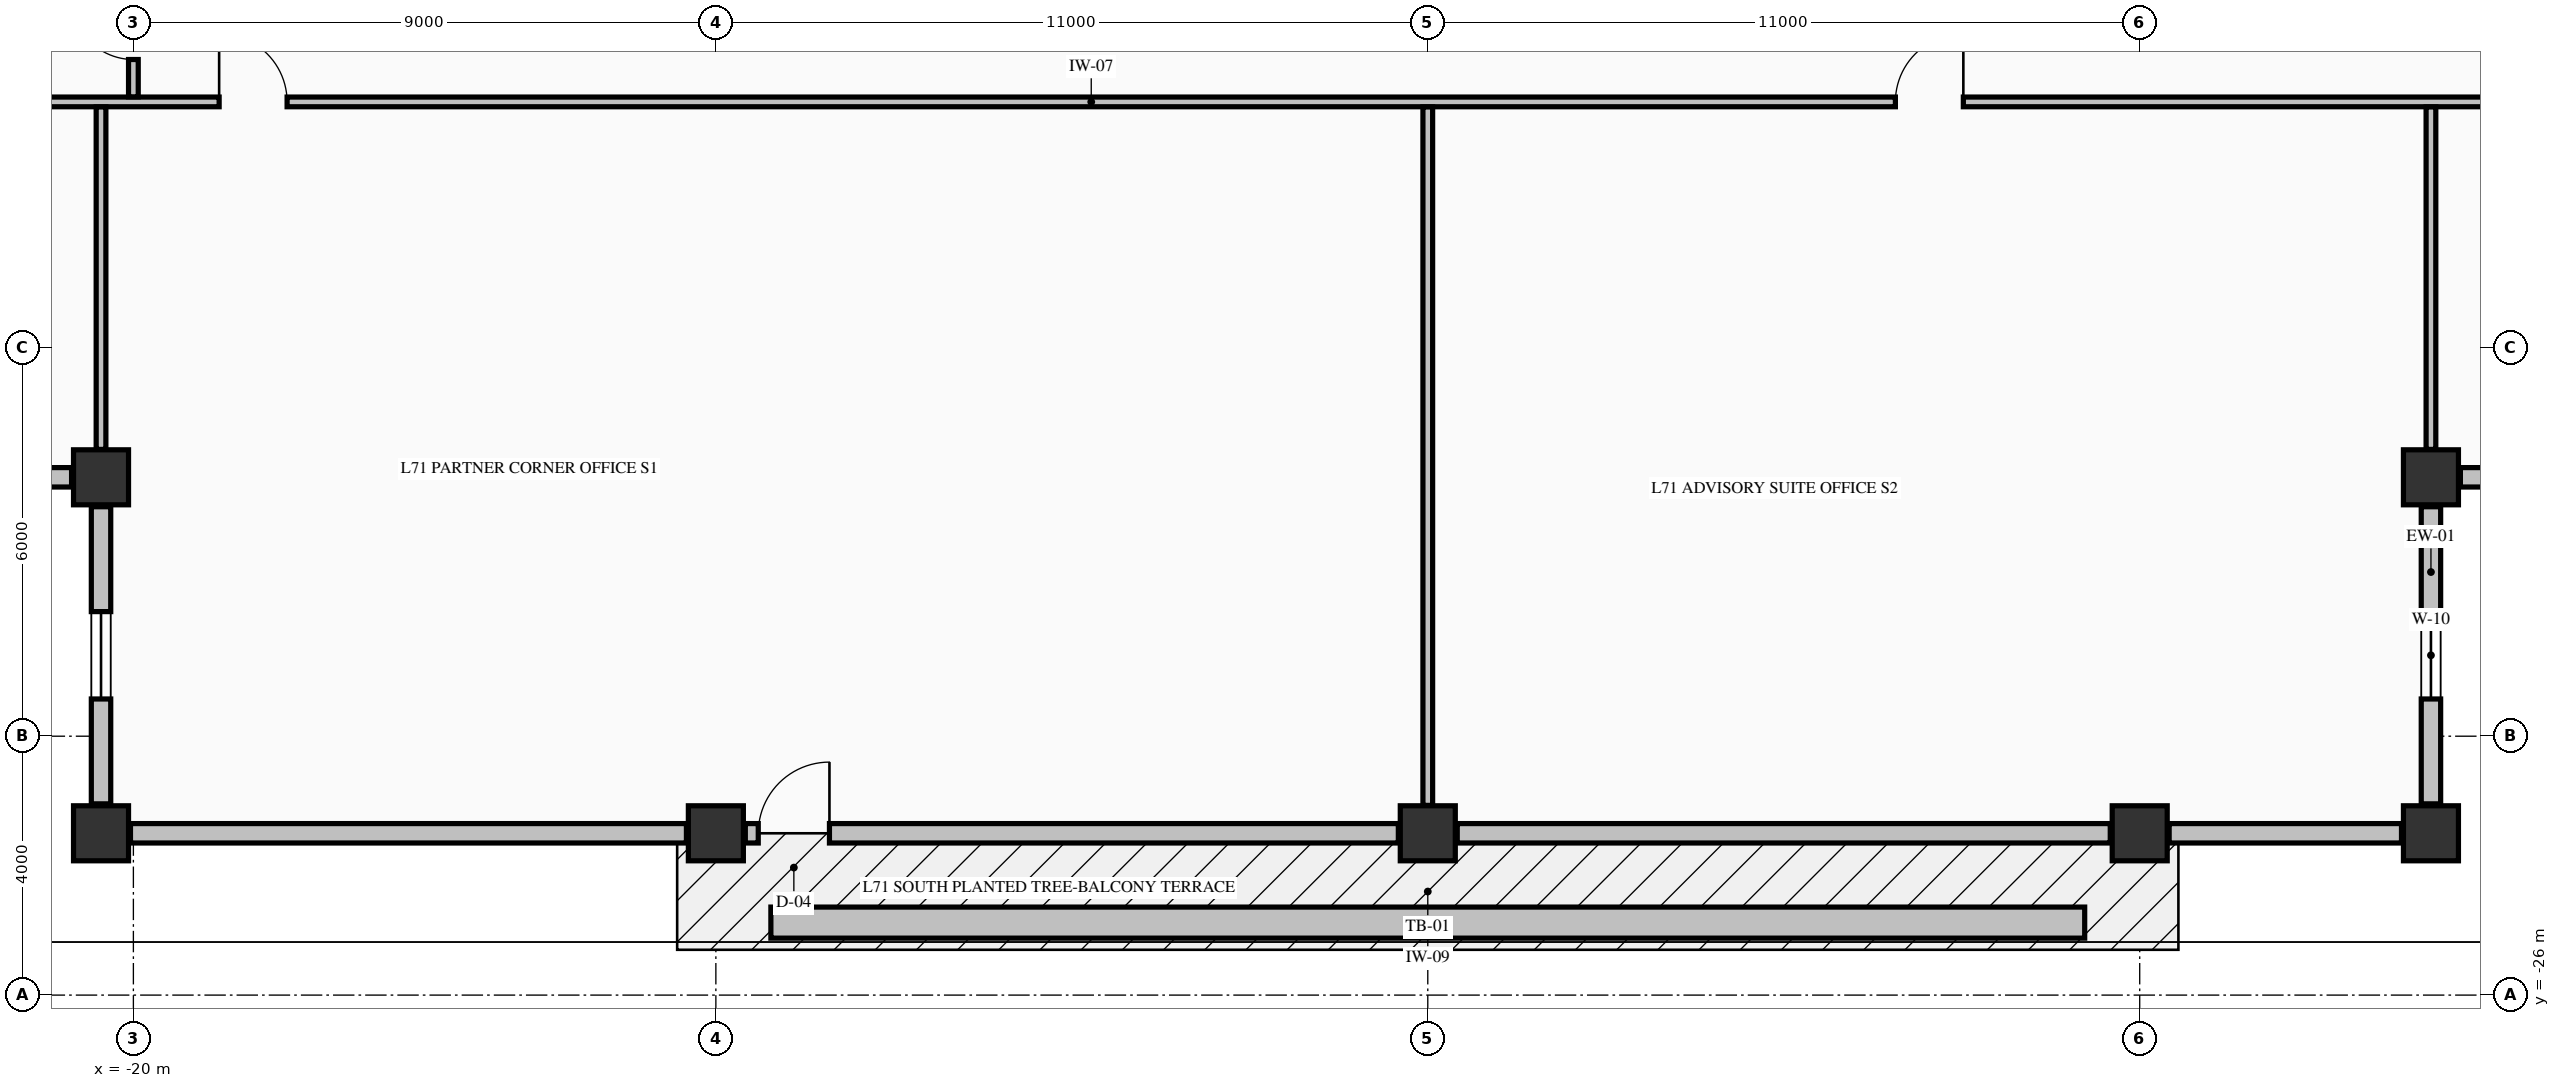
"""IFC4 building model, lengths in metres.
Left out: names, types, materials, properties, quantities, classifications, styles, units other than length and angle.
Written with IfcOpenShell. Run it as: python <this file> out.ifc"""

import sys

from ifc_helpers import new_model, si_unit, direction, frame, frame_2d, origin, origin_2d, place, context, subcontext, project, spatial, rectangle, extrude, element, fill, save


model = new_model("IFC4")
c1 = context("Model", 3, precision=1e-05, world=origin(), true_north=direction((0.0, 1.0)))
c2 = subcontext(c1, "Body", "Model", "MODEL_VIEW")
j1 = project(units=[si_unit("LENGTHUNIT", "METRE"), si_unit("PLANEANGLEUNIT", "RADIAN")], contexts=[c1])
p1 = place(None, origin())
s1 = spatial("IfcSite", under=j1, at=p1, CompositionType="ELEMENT")
p2 = place(p1, origin())
s2 = spatial("IfcBuilding", under=s1, at=p2, CompositionType="ELEMENT")
p3 = place(p2, frame((0.0, 0.0, 267.35)))
s3 = spatial("IfcBuildingStorey", under=s2, at=p3, CompositionType="ELEMENT", Elevation=267.35)
for number, where, z_axis, x_axis in (
    (1, (-20.5, -23.5, -0.25), (0.0, 0.0, 1.0), (1.0, 0.0, 0.0)),
    (2, (-11.0, -23.5, -0.25), (0.0, 0.0, 1.0), (1.0, 0.0, 0.0)),
    (3, (0.0, -23.5, -0.25), (0.0, 0.0, 1.0), (1.0, 0.0, 0.0)),
    (4, (11.0, -23.5, -0.25), (0.0, 0.0, 1.0), (1.0, 0.0, 0.0)),
    (5, (15.5, -23.5, -0.25), (0.0, 0.0, 1.0), (1.0, 0.0, 0.0)),
    (6, (-20.5, -18.0, -0.25), (0.0, 0.0, 1.0), (1.0, 0.0, 0.0)),
    (7, (15.5, -18.0, -0.25), (0.0, 0.0, 1.0), (1.0, 0.0, 0.0)),
):
    element("IfcColumn", number, at=place(p3, frame(where, z_axis=z_axis, x_axis=x_axis)), inside=s3, PredefinedType="COLUMN", context=c2, shape_type="SweptSolid", body=[
        extrude(rectangle(XDim=0.85, YDim=0.85, at=origin_2d()), origin(), (0.0, 0.0, 1.0), 3.155),
    ])
p4 = place(p3, frame((15.5, -23.045, 0.0), z_axis=(0.0, 0.0, 1.0), x_axis=(0.0, 1.0, 0.0)))
e8 = element("IfcWall", 8, at=p4, inside=s3, PredefinedType="STANDARD", context=c2, shape_type="SweptSolid", body=[
    extrude(rectangle(XDim=4.59, YDim=0.3, at=frame_2d((2.295, 0.0))), origin(), (0.0, 0.0, 1.0), 2.297),
])
p5 = place(p4, frame((1.62, 0.0, 0.68)))
e9 = element("IfcOpeningElement", 9, at=p5, cuts=e8, PredefinedType="OPENING", context=c2, shape_type="SweptSolid", body=[
    extrude(rectangle(XDim=1.35, YDim=1.42, at=frame_2d((0.675, 0.71))), frame((0.0, 0.16, 0.0), z_axis=(0.0, -1.0, 0.0), x_axis=(1.0, 0.0, 0.0)), (0.0, 0.0, 1.0), 0.32),
])
p6 = place(p3, frame((15.955, -18.0, 0.0), z_axis=(0.0, 0.0, 1.0), x_axis=(1.0, 0.0, 0.0)))
e10 = element("IfcWall", 10, at=p6, inside=s3, PredefinedType="STANDARD", context=c2, shape_type="SweptSolid", body=[
    extrude(rectangle(XDim=4.59, YDim=0.3, at=frame_2d((2.295, 0.0))), origin(), (0.0, 0.0, 1.0), 2.297),
])
p7 = place(p6, frame((1.62, 0.0, 0.68)))
e11 = element("IfcOpeningElement", 11, at=p7, cuts=e10, PredefinedType="OPENING", context=c2, shape_type="SweptSolid", body=[
    extrude(rectangle(XDim=1.35, YDim=1.42, at=frame_2d((0.675, 0.71))), frame((0.0, 0.16, 0.0), z_axis=(0.0, -1.0, 0.0), x_axis=(1.0, 0.0, 0.0)), (0.0, 0.0, 1.0), 0.32),
])
p8 = place(p3, frame((-25.545, -18.0, 0.0), z_axis=(0.0, 0.0, 1.0), x_axis=(1.0, 0.0, 0.0)))
e12 = element("IfcWall", 12, at=p8, inside=s3, PredefinedType="STANDARD", context=c2, shape_type="SweptSolid", body=[
    extrude(rectangle(XDim=4.59, YDim=0.3, at=frame_2d((2.295, 0.0))), origin(), (0.0, 0.0, 1.0), 2.297),
])
p9 = place(p8, frame((1.62, 0.0, 0.68)))
e13 = element("IfcOpeningElement", 13, at=p9, cuts=e12, PredefinedType="OPENING", context=c2, shape_type="SweptSolid", body=[
    extrude(rectangle(XDim=1.35, YDim=1.42, at=frame_2d((0.675, 0.71))), frame((0.0, 0.16, 0.0), z_axis=(0.0, -1.0, 0.0), x_axis=(1.0, 0.0, 0.0)), (0.0, 0.0, 1.0), 0.32),
])
p10 = place(p3, frame((-20.5, -18.455, 0.0), z_axis=(0.0, 0.0, 1.0), x_axis=(0.0, -1.0, 0.0)))
e14 = element("IfcWall", 14, at=p10, inside=s3, PredefinedType="STANDARD", context=c2, shape_type="SweptSolid", body=[
    extrude(rectangle(XDim=4.59, YDim=0.3, at=frame_2d((2.295, 0.0))), origin(), (0.0, 0.0, 1.0), 2.297),
])
p11 = place(p10, frame((1.62, 0.0, 0.68)))
e15 = element("IfcOpeningElement", 15, at=p11, cuts=e14, PredefinedType="OPENING", context=c2, shape_type="SweptSolid", body=[
    extrude(rectangle(XDim=1.35, YDim=1.42, at=frame_2d((0.675, 0.71))), frame((0.0, 0.16, 0.0), z_axis=(0.0, -1.0, 0.0), x_axis=(1.0, 0.0, 0.0)), (0.0, 0.0, 1.0), 0.32),
])
p12 = place(p3, frame((-20.045, -23.5, 0.0), z_axis=(0.0, 0.0, 1.0), x_axis=(1.0, 0.0, 0.0)))
e16 = element("IfcWall", 16, at=p12, inside=s3, PredefinedType="STANDARD", context=c2, shape_type="SweptSolid", body=[
    extrude(rectangle(XDim=8.59, YDim=0.3, at=frame_2d((4.295, 0.0))), origin(), (0.0, 0.0, 1.0), 2.297),
])
p13 = place(p3, frame((-10.545, -23.5, 0.0), z_axis=(0.0, 0.0, 1.0), x_axis=(1.0, 0.0, 0.0)))
e17 = element("IfcWall", 17, at=p13, inside=s3, PredefinedType="STANDARD", context=c2, shape_type="SweptSolid", body=[
    extrude(rectangle(XDim=10.09, YDim=0.3, at=frame_2d((5.045, 0.0))), origin(), (0.0, 0.0, 1.0), 2.297),
])
p14 = place(p13, frame((0.2, 0.0, 0.0)))
e18 = element("IfcOpeningElement", 18, at=p14, cuts=e17, PredefinedType="OPENING", context=c2, shape_type="SweptSolid", body=[
    extrude(rectangle(XDim=1.1, YDim=2.15, at=frame_2d((0.55, 1.075))), frame((0.0, 0.16, 0.0), z_axis=(0.0, -1.0, 0.0), x_axis=(1.0, 0.0, 0.0)), (0.0, 0.0, 1.0), 0.32),
])
p15 = place(p3, frame((0.455, -23.5, 0.0), z_axis=(0.0, 0.0, 1.0), x_axis=(1.0, 0.0, 0.0)))
e19 = element("IfcWall", 19, at=p15, inside=s3, PredefinedType="STANDARD", context=c2, shape_type="SweptSolid", body=[
    extrude(rectangle(XDim=10.09, YDim=0.3, at=frame_2d((5.045, 0.0))), origin(), (0.0, 0.0, 1.0), 2.297),
])
p16 = place(p3, frame((11.455, -23.5, 0.0), z_axis=(0.0, 0.0, 1.0), x_axis=(1.0, 0.0, 0.0)))
e20 = element("IfcWall", 20, at=p16, inside=s3, PredefinedType="STANDARD", context=c2, shape_type="SweptSolid", body=[
    extrude(rectangle(XDim=3.59, YDim=0.3, at=frame_2d((1.795, 0.0))), origin(), (0.0, 0.0, 1.0), 2.297),
])
p17 = place(p3, frame((-25.835, -12.2, 0.0), z_axis=(0.0, 0.0, 1.0), x_axis=(1.0, 0.0, 0.0)))
e21 = element("IfcWall", 21, at=p17, inside=s3, PredefinedType="PARTITIONING", context=c2, shape_type="SweptSolid", body=[
    extrude(rectangle(XDim=45.91, YDim=0.15, at=frame_2d((22.955, 0.0))), origin(), (0.0, 0.0, 1.0), 2.905),
])
p18 = place(p17, frame((7.16, 0.0, 0.0)))
e22 = element("IfcOpeningElement", 22, at=p18, cuts=e21, PredefinedType="OPENING", context=c2, shape_type="SweptSolid", body=[
    extrude(rectangle(XDim=1.05, YDim=2.15, at=frame_2d((0.525, 1.075))), frame((0.0, 0.085, 0.0), z_axis=(0.0, -1.0, 0.0), x_axis=(1.0, 0.0, 0.0)), (0.0, 0.0, 1.0), 0.17),
])
p19 = place(p17, frame((33.06, 0.0, 0.0)))
e23 = element("IfcOpeningElement", 23, at=p19, cuts=e21, PredefinedType="OPENING", context=c2, shape_type="SweptSolid", body=[
    extrude(rectangle(XDim=1.05, YDim=2.15, at=frame_2d((0.525, 1.075))), frame((0.0, 0.085, 0.0), z_axis=(0.0, -1.0, 0.0), x_axis=(1.0, 0.0, 0.0)), (0.0, 0.0, 1.0), 0.17),
])
p20 = place(p3, frame((-20.5, -17.569, 0.0), z_axis=(0.0, 0.0, 1.0), x_axis=(0.0, 1.0, 0.0)))
e24 = element("IfcWall", 24, at=p20, inside=s3, PredefinedType="PARTITIONING", context=c2, shape_type="SweptSolid", body=[
    extrude(rectangle(XDim=5.291, YDim=0.15, at=frame_2d((2.646, 0.0))), origin(), (0.0, 0.0, 1.0), 2.905),
])
p21 = place(p3, frame((-20.0, -12.122, 0.0), z_axis=(0.0, 0.0, 1.0), x_axis=(0.0, 1.0, 0.0)))
e25 = element("IfcWall", 25, at=p21, inside=s3, PredefinedType="PARTITIONING", context=c2, shape_type="SweptSolid", body=[
    extrude(rectangle(XDim=1.816, YDim=0.15, at=frame_2d((0.908, 0.0))), origin(), (0.0, 0.0, 1.0), 2.905),
])
p22 = place(p21, frame((0.577, 0.0, 0.0)))
e26 = element("IfcOpeningElement", 26, at=p22, cuts=e25, PredefinedType="OPENING", context=c2, shape_type="SweptSolid", body=[
    extrude(rectangle(XDim=0.95, YDim=2.15, at=frame_2d((0.475, 1.075))), frame((0.0, 0.085, 0.0), z_axis=(0.0, -1.0, 0.0), x_axis=(1.0, 0.0, 0.0)), (0.0, 0.0, 1.0), 0.17),
])
p23 = place(p3, frame((0.0, -23.069, 0.0), z_axis=(0.0, 0.0, 1.0), x_axis=(0.0, 1.0, 0.0)))
e27 = element("IfcWall", 27, at=p23, inside=s3, PredefinedType="PARTITIONING", context=c2, shape_type="SweptSolid", body=[
    extrude(rectangle(XDim=10.791, YDim=0.15, at=frame_2d((5.396, 0.0))), origin(), (0.0, 0.0, 1.0), 2.495),
])
p24 = place(p3, frame((15.5, -17.569, 0.0), z_axis=(0.0, 0.0, 1.0), x_axis=(0.0, 1.0, 0.0)))
e28 = element("IfcWall", 28, at=p24, inside=s3, PredefinedType="PARTITIONING", context=c2, shape_type="SweptSolid", body=[
    extrude(rectangle(XDim=5.291, YDim=0.15, at=frame_2d((2.646, 0.0))), origin(), (0.0, 0.0, 1.0), 2.905),
])
p25 = place(p3, frame((-10.15, -24.88, -0.04), z_axis=(0.0, 0.0, 1.0), x_axis=(1.0, 0.0, 0.0)))
e29 = element("IfcWall", 29, at=p25, inside=s3, PredefinedType="PARAPET", context=c2, shape_type="SweptSolid", body=[
    extrude(rectangle(XDim=20.3, YDim=0.48, at=frame_2d((10.15, 0.0))), origin(), (0.0, 0.0, 1.0), 0.52),
])
p26 = place(p5, origin())
e30 = element("IfcWindow", 30, at=p26, inside=s3, PartitioningType="SINGLE_PANEL", PredefinedType="WINDOW", context=c2, shape_type="SweptSolid", body=[
    extrude(rectangle(XDim=1.35, YDim=1.42, at=frame_2d((0.675, 0.71))), frame((0.0, 0.03, 0.0), z_axis=(0.0, -1.0, 0.0), x_axis=(1.0, 0.0, 0.0)), (0.0, 0.0, 1.0), 0.06),
])
fill(e9, e30)
p27 = place(p11, origin())
e31 = element("IfcWindow", 31, at=p27, inside=s3, PartitioningType="SINGLE_PANEL", PredefinedType="WINDOW", context=c2, shape_type="SweptSolid", body=[
    extrude(rectangle(XDim=1.35, YDim=1.42, at=frame_2d((0.675, 0.71))), frame((0.0, 0.03, 0.0), z_axis=(0.0, -1.0, 0.0), x_axis=(1.0, 0.0, 0.0)), (0.0, 0.0, 1.0), 0.06),
])
fill(e15, e31)
p28 = place(p14, origin())
e32 = element("IfcDoor", 32, at=p28, inside=s3, OperationType="SINGLE_SWING_RIGHT", PredefinedType="DOOR", context=c2, shape_type="SweptSolid", body=[
    extrude(rectangle(XDim=1.1, YDim=2.15, at=frame_2d((0.55, 1.075))), frame((0.0, 0.025, 0.0), z_axis=(0.0, -1.0, 0.0), x_axis=(1.0, 0.0, 0.0)), (0.0, 0.0, 1.0), 0.05),
])
fill(e18, e32)
p29 = place(p18, origin())
e33 = element("IfcDoor", 33, at=p29, inside=s3, OperationType="SINGLE_SWING_LEFT", PredefinedType="DOOR", context=c2, shape_type="SweptSolid", body=[
    extrude(rectangle(XDim=1.05, YDim=2.15, at=frame_2d((0.525, 1.075))), frame((0.0, 0.025, 0.0), z_axis=(0.0, -1.0, 0.0), x_axis=(1.0, 0.0, 0.0)), (0.0, 0.0, 1.0), 0.05),
])
fill(e22, e33)
p30 = place(p19, origin())
e34 = element("IfcDoor", 34, at=p30, inside=s3, OperationType="SINGLE_SWING_RIGHT", PredefinedType="DOOR", context=c2, shape_type="SweptSolid", body=[
    extrude(rectangle(XDim=1.05, YDim=2.15, at=frame_2d((0.525, 1.075))), frame((0.0, 0.025, 0.0), z_axis=(0.0, -1.0, 0.0), x_axis=(1.0, 0.0, 0.0)), (0.0, 0.0, 1.0), 0.05),
])
fill(e23, e34)
p31 = place(p22, origin())
e35 = element("IfcDoor", 35, at=p31, inside=s3, OperationType="SINGLE_SWING_RIGHT", PredefinedType="DOOR", context=c2, shape_type="SweptSolid", body=[
    extrude(rectangle(XDim=0.95, YDim=2.15, at=frame_2d((0.475, 1.075))), frame((0.0, 0.025, 0.0), z_axis=(0.0, -1.0, 0.0), x_axis=(1.0, 0.0, 0.0)), (0.0, 0.0, 1.0), 0.05),
])
fill(e26, e35)
save(model, sys.argv[1])
